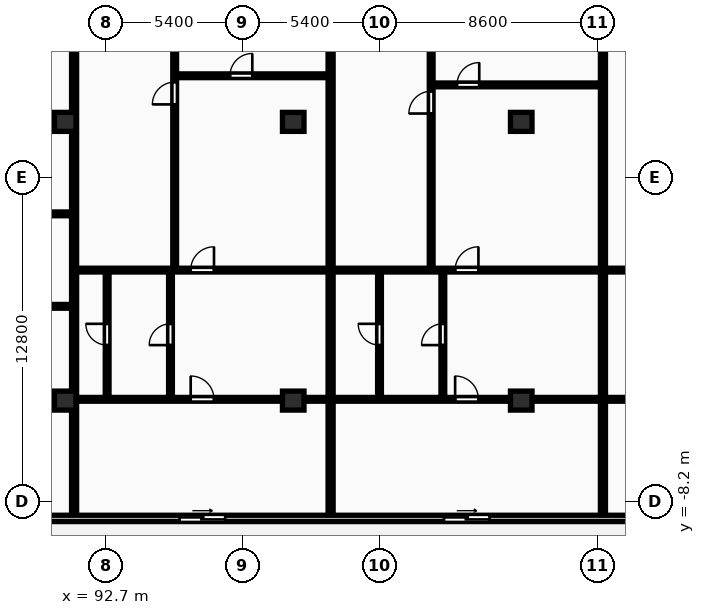
"""IFC4 building model, lengths in metres.
Left out: names, types, materials, properties, quantities, classifications, styles, units other than length and angle.
Written with IfcOpenShell. Run it as: python <this file> out.ifc"""

import sys

from ifc_helpers import new_model, si_unit, direction, frame, frame_2d, origin, origin_2d, place, context, subcontext, project, spatial, rectangle, extrude, element, fill, save


model = new_model("IFC4")
c1 = context("Model", 3, precision=1e-05, world=origin(), true_north=direction((0.0, 1.0)))
c2 = subcontext(c1, "Body", "Model", "MODEL_VIEW")
j1 = project(units=[si_unit("LENGTHUNIT", "METRE"), si_unit("PLANEANGLEUNIT", "RADIAN")], contexts=[c1])
p1 = place(None, origin())
s1 = spatial("IfcSite", under=j1, at=p1, CompositionType="ELEMENT")
p2 = place(p1, origin())
s2 = spatial("IfcBuilding", under=s1, at=p2, CompositionType="ELEMENT")
p3 = place(p2, frame((0.0, 0.0, 100.3)))
s3 = spatial("IfcBuildingStorey", under=s2, at=p3, CompositionType="ELEMENT", Elevation=100.3)
for number, where, z_axis, x_axis in (
    (1, (91.1, -4.2, 0.0), (0.0, 0.0, 1.0), (1.0, 0.0, 0.0)),
    (2, (91.1, 6.8, 0.0), (0.0, 0.0, 1.0), (1.0, 0.0, 0.0)),
    (3, (100.1, -4.2, 0.0), (0.0, 0.0, 1.0), (1.0, 0.0, 0.0)),
    (4, (100.1, 6.8, 0.0), (0.0, 0.0, 1.0), (1.0, 0.0, 0.0)),
    (5, (109.1, -4.2, 0.0), (0.0, 0.0, 1.0), (1.0, 0.0, 0.0)),
    (6, (109.1, 6.8, 0.0), (0.0, 0.0, 1.0), (1.0, 0.0, 0.0)),
):
    element("IfcColumn", number, at=place(p3, frame(where, z_axis=z_axis, x_axis=x_axis)), inside=s3, PredefinedType="COLUMN", context=c2, shape_type="SweptSolid", body=[
        extrude(rectangle(XDim=0.85, YDim=0.75, at=origin_2d()), origin(), (0.0, 0.0, 1.0), 3.25),
    ])
p4 = place(p3, frame((72.7, -8.85, 0.0), z_axis=(0.0, 0.0, 1.0), x_axis=(1.0, 0.0, 0.0)))
e7 = element("IfcWall", 7, at=p4, inside=s3, PredefinedType="STANDARD", context=c2, shape_type="SweptSolid", body=[
    extrude(rectangle(XDim=58.0, YDim=0.25, at=frame_2d((29.0, 0.0))), origin(), (0.0, 0.0, 1.0), 2.97),
])
p5 = place(p4, frame((3.137, 0.0, 0.0)))
e8 = element("IfcOpeningElement", 8, at=p5, cuts=e7, PredefinedType="OPENING", context=c2, shape_type="SweptSolid", body=[
    extrude(rectangle(XDim=1.8, YDim=2.2, at=frame_2d((0.9, 1.1))), frame((0.0, 0.135, 0.0), z_axis=(0.0, -1.0, 0.0), x_axis=(1.0, 0.0, 0.0)), (0.0, 0.0, 1.0), 0.27),
])
p6 = place(p4, frame((12.093, 0.0, 0.85)))
e9 = element("IfcOpeningElement", 9, at=p6, cuts=e7, PredefinedType="OPENING", context=c2, shape_type="SweptSolid", body=[
    extrude(rectangle(XDim=2.4, YDim=1.9, at=frame_2d((1.2, 0.95))), frame((0.0, 0.135, 0.0), z_axis=(0.0, -1.0, 0.0), x_axis=(1.0, 0.0, 0.0)), (0.0, 0.0, 1.0), 0.27),
])
p7 = place(p4, frame((22.913, 0.0, 0.0)))
e10 = element("IfcOpeningElement", 10, at=p7, cuts=e7, PredefinedType="OPENING", context=c2, shape_type="SweptSolid", body=[
    extrude(rectangle(XDim=1.8, YDim=2.2, at=frame_2d((0.9, 1.1))), frame((0.0, 0.135, 0.0), z_axis=(0.0, -1.0, 0.0), x_axis=(1.0, 0.0, 0.0)), (0.0, 0.0, 1.0), 0.27),
])
p8 = place(p4, frame((33.35, 0.0, 0.0)))
e11 = element("IfcOpeningElement", 11, at=p8, cuts=e7, PredefinedType="OPENING", context=c2, shape_type="SweptSolid", body=[
    extrude(rectangle(XDim=1.8, YDim=2.2, at=frame_2d((0.9, 1.1))), frame((0.0, 0.135, 0.0), z_axis=(0.0, -1.0, 0.0), x_axis=(1.0, 0.0, 0.0)), (0.0, 0.0, 1.0), 0.27),
])
p9 = place(p4, frame((49.275, 0.0, 0.85)))
e12 = element("IfcOpeningElement", 12, at=p9, cuts=e7, PredefinedType="OPENING", context=c2, shape_type="SweptSolid", body=[
    extrude(rectangle(XDim=2.4, YDim=1.9, at=frame_2d((1.2, 0.95))), frame((0.0, 0.135, 0.0), z_axis=(0.0, -1.0, 0.0), x_axis=(1.0, 0.0, 0.0)), (0.0, 0.0, 1.0), 0.27),
])
p10 = place(p4, frame((42.613, 0.0, 0.0)))
e13 = element("IfcOpeningElement", 13, at=p10, cuts=e7, PredefinedType="OPENING", context=c2, shape_type="SweptSolid", body=[
    extrude(rectangle(XDim=1.8, YDim=2.2, at=frame_2d((0.9, 1.1))), frame((0.0, 0.135, 0.0), z_axis=(0.0, -1.0, 0.0), x_axis=(1.0, 0.0, 0.0)), (0.0, 0.0, 1.0), 0.27),
])
p11 = place(p4, frame((54.575, 0.0, 0.85)))
e14 = element("IfcOpeningElement", 14, at=p11, cuts=e7, PredefinedType="OPENING", context=c2, shape_type="SweptSolid", body=[
    extrude(rectangle(XDim=2.4, YDim=1.9, at=frame_2d((1.2, 0.95))), frame((0.0, 0.135, 0.0), z_axis=(0.0, -1.0, 0.0), x_axis=(1.0, 0.0, 0.0)), (0.0, 0.0, 1.0), 0.27),
])
p12 = place(p3, frame((91.45, -8.7, 0.0), z_axis=(0.0, 0.0, 1.0), x_axis=(0.0, 1.0, 0.0)))
e15 = element("IfcWall", 15, at=p12, inside=s3, PredefinedType="PARTITIONING", context=c2, shape_type="SweptSolid", body=[
    extrude(rectangle(XDim=24.57, YDim=0.2, at=frame_2d((12.285, 0.0))), origin(), (0.0, 0.0, 1.0), 2.97),
])
for number, where, z_axis, x_axis in (
    (16, (88.01, -0.48, 0.0), (0.0, 0.0, 1.0), (1.0, 0.0, 0.0)),
    (17, (88.01, 3.17, 0.0), (0.0, 0.0, 1.0), (1.0, 0.0, 0.0)),
):
    element("IfcWall", number, at=place(p3, frame(where, z_axis=z_axis, x_axis=x_axis)), inside=s3, PredefinedType="PARTITIONING", context=c2, shape_type="SweptSolid", body=[
        extrude(rectangle(XDim=3.36, YDim=0.15, at=frame_2d((1.68, 0.0))), origin(), (0.0, 0.0, 1.0), 2.97),
    ])
p13 = place(p3, frame((72.78, -4.15, 0.0), z_axis=(0.0, 0.0, 1.0), x_axis=(1.0, 0.0, 0.0)))
e18 = element("IfcWall", 18, at=p13, inside=s3, PredefinedType="PARTITIONING", context=c2, shape_type="SweptSolid", body=[
    extrude(rectangle(XDim=18.59, YDim=0.15, at=frame_2d((9.295, 0.0))), origin(), (0.0, 0.0, 1.0), 2.663),
])
p14 = place(p13, frame((6.685, 0.0, 0.0)))
e19 = element("IfcOpeningElement", 19, at=p14, cuts=e18, PredefinedType="OPENING", context=c2, shape_type="SweptSolid", body=[
    extrude(rectangle(XDim=0.94, YDim=2.1, at=frame_2d((0.47, 1.05))), frame((0.0, 0.085, 0.0), z_axis=(0.0, -1.0, 0.0), x_axis=(1.0, 0.0, 0.0)), (0.0, 0.0, 1.0), 0.17),
])
p15 = place(p13, frame((10.935, 0.0, 0.0)))
e20 = element("IfcOpeningElement", 20, at=p15, cuts=e18, PredefinedType="OPENING", context=c2, shape_type="SweptSolid", body=[
    extrude(rectangle(XDim=0.94, YDim=2.1, at=frame_2d((0.47, 1.05))), frame((0.0, 0.085, 0.0), z_axis=(0.0, -1.0, 0.0), x_axis=(1.0, 0.0, 0.0)), (0.0, 0.0, 1.0), 0.17),
])
p16 = place(p3, frame((101.575, -8.7, 0.0), z_axis=(0.0, 0.0, 1.0), x_axis=(0.0, 1.0, 0.0)))
e21 = element("IfcWall", 21, at=p16, inside=s3, PredefinedType="PARTITIONING", context=c2, shape_type="SweptSolid", body=[
    extrude(rectangle(XDim=24.57, YDim=0.2, at=frame_2d((12.285, 0.0))), origin(), (0.0, 0.0, 1.0), 2.97),
])
p17 = place(p3, frame((95.48, 8.62, 0.0), z_axis=(0.0, 0.0, 1.0), x_axis=(1.0, 0.0, 0.0)))
e22 = element("IfcWall", 22, at=p17, inside=s3, PredefinedType="PARTITIONING", context=c2, shape_type="SweptSolid", body=[
    extrude(rectangle(XDim=6.015, YDim=0.15, at=frame_2d((3.008, 0.0))), origin(), (0.0, 0.0, 1.0), 2.97),
])
p18 = place(p17, frame((2.124, 0.0, 0.0)))
e23 = element("IfcOpeningElement", 23, at=p18, cuts=e22, PredefinedType="OPENING", context=c2, shape_type="SweptSolid", body=[
    extrude(rectangle(XDim=0.88, YDim=2.06, at=frame_2d((0.44, 1.03))), frame((0.0, 0.085, 0.0), z_axis=(0.0, -1.0, 0.0), x_axis=(1.0, 0.0, 0.0)), (0.0, 0.0, 1.0), 0.17),
])
p19 = place(p3, frame((95.42, 0.99, 0.0), z_axis=(0.0, 0.0, 1.0), x_axis=(0.0, 1.0, 0.0)))
e24 = element("IfcWall", 24, at=p19, inside=s3, PredefinedType="PARTITIONING", context=c2, shape_type="SweptSolid", body=[
    extrude(rectangle(XDim=14.9, YDim=0.15, at=frame_2d((7.45, 0.0))), origin(), (0.0, 0.0, 1.0), 2.97),
])
p20 = place(p19, frame((6.5, 0.0, 0.0)))
e25 = element("IfcOpeningElement", 25, at=p20, cuts=e24, PredefinedType="OPENING", context=c2, shape_type="SweptSolid", body=[
    extrude(rectangle(XDim=0.88, YDim=2.06, at=frame_2d((0.44, 1.03))), frame((0.0, 0.085, 0.0), z_axis=(0.0, -1.0, 0.0), x_axis=(1.0, 0.0, 0.0)), (0.0, 0.0, 1.0), 0.17),
])
p21 = place(p3, frame((92.755, -4.09, 0.0), z_axis=(0.0, 0.0, 1.0), x_axis=(0.0, 1.0, 0.0)))
e26 = element("IfcWall", 26, at=p21, inside=s3, PredefinedType="PARTITIONING", context=c2, shape_type="SweptSolid", body=[
    extrude(rectangle(XDim=5.0, YDim=0.15, at=frame_2d((2.5, 0.0))), origin(), (0.0, 0.0, 1.0), 2.97),
])
p22 = place(p21, frame((2.08, 0.0, 0.0)))
e27 = element("IfcOpeningElement", 27, at=p22, cuts=e26, PredefinedType="OPENING", context=c2, shape_type="SweptSolid", body=[
    extrude(rectangle(XDim=0.84, YDim=2.04, at=frame_2d((0.42, 1.02))), frame((0.0, 0.085, 0.0), z_axis=(0.0, -1.0, 0.0), x_axis=(1.0, 0.0, 0.0)), (0.0, 0.0, 1.0), 0.17),
])
p23 = place(p3, frame((95.255, -4.09, 0.0), z_axis=(0.0, 0.0, 1.0), x_axis=(0.0, 1.0, 0.0)))
e28 = element("IfcWall", 28, at=p23, inside=s3, PredefinedType="PARTITIONING", context=c2, shape_type="SweptSolid", body=[
    extrude(rectangle(XDim=5.0, YDim=0.15, at=frame_2d((2.5, 0.0))), origin(), (0.0, 0.0, 1.0), 2.97),
])
p24 = place(p23, frame((2.08, 0.0, 0.0)))
e29 = element("IfcOpeningElement", 29, at=p24, cuts=e28, PredefinedType="OPENING", context=c2, shape_type="SweptSolid", body=[
    extrude(rectangle(XDim=0.84, YDim=2.04, at=frame_2d((0.42, 1.02))), frame((0.0, 0.085, 0.0), z_axis=(0.0, -1.0, 0.0), x_axis=(1.0, 0.0, 0.0)), (0.0, 0.0, 1.0), 0.17),
])
p25 = place(p3, frame((91.53, 0.95, 0.0), z_axis=(0.0, 0.0, 1.0), x_axis=(1.0, 0.0, 0.0)))
e30 = element("IfcWall", 30, at=p25, inside=s3, PredefinedType="PARTITIONING", context=c2, shape_type="SweptSolid", body=[
    extrude(rectangle(XDim=9.965, YDim=0.15, at=frame_2d((4.982, 0.0))), origin(), (0.0, 0.0, 1.0), 2.97),
])
p26 = place(p25, frame((4.522, 0.0, 0.0)))
e31 = element("IfcOpeningElement", 31, at=p26, cuts=e30, PredefinedType="OPENING", context=c2, shape_type="SweptSolid", body=[
    extrude(rectangle(XDim=0.92, YDim=2.08, at=frame_2d((0.46, 1.04))), frame((0.0, 0.085, 0.0), z_axis=(0.0, -1.0, 0.0), x_axis=(1.0, 0.0, 0.0)), (0.0, 0.0, 1.0), 0.17),
])
p27 = place(p3, frame((91.53, -4.15, 0.0), z_axis=(0.0, 0.0, 1.0), x_axis=(1.0, 0.0, 0.0)))
e32 = element("IfcWall", 32, at=p27, inside=s3, PredefinedType="PARTITIONING", context=c2, shape_type="SweptSolid", body=[
    extrude(rectangle(XDim=9.965, YDim=0.15, at=frame_2d((4.982, 0.0))), origin(), (0.0, 0.0, 1.0), 2.663),
])
p28 = place(p27, frame((4.522, 0.0, 0.0)))
e33 = element("IfcOpeningElement", 33, at=p28, cuts=e32, PredefinedType="OPENING", context=c2, shape_type="SweptSolid", body=[
    extrude(rectangle(XDim=0.92, YDim=2.08, at=frame_2d((0.46, 1.04))), frame((0.0, 0.085, 0.0), z_axis=(0.0, -1.0, 0.0), x_axis=(1.0, 0.0, 0.0)), (0.0, 0.0, 1.0), 0.17),
])
p29 = place(p3, frame((112.325, -8.7, 0.0), z_axis=(0.0, 0.0, 1.0), x_axis=(0.0, 1.0, 0.0)))
e34 = element("IfcWall", 34, at=p29, inside=s3, PredefinedType="PARTITIONING", context=c2, shape_type="SweptSolid", body=[
    extrude(rectangle(XDim=24.57, YDim=0.2, at=frame_2d((12.285, 0.0))), origin(), (0.0, 0.0, 1.0), 2.97),
])
p30 = place(p3, frame((105.605, 8.26, 0.0), z_axis=(0.0, 0.0, 1.0), x_axis=(1.0, 0.0, 0.0)))
e35 = element("IfcWall", 35, at=p30, inside=s3, PredefinedType="PARTITIONING", context=c2, shape_type="SweptSolid", body=[
    extrude(rectangle(XDim=6.64, YDim=0.15, at=frame_2d((3.32, 0.0))), origin(), (0.0, 0.0, 1.0), 2.97),
])
p31 = place(p30, frame((0.957, 0.0, 0.0)))
e36 = element("IfcOpeningElement", 36, at=p31, cuts=e35, PredefinedType="OPENING", context=c2, shape_type="SweptSolid", body=[
    extrude(rectangle(XDim=0.88, YDim=2.06, at=frame_2d((0.44, 1.03))), frame((0.0, 0.085, 0.0), z_axis=(0.0, -1.0, 0.0), x_axis=(1.0, 0.0, 0.0)), (0.0, 0.0, 1.0), 0.17),
])
p32 = place(p3, frame((105.545, 0.99, 0.0), z_axis=(0.0, 0.0, 1.0), x_axis=(0.0, 1.0, 0.0)))
e37 = element("IfcWall", 37, at=p32, inside=s3, PredefinedType="PARTITIONING", context=c2, shape_type="SweptSolid", body=[
    extrude(rectangle(XDim=14.9, YDim=0.15, at=frame_2d((7.45, 0.0))), origin(), (0.0, 0.0, 1.0), 2.97),
])
p33 = place(p32, frame((6.14, 0.0, 0.0)))
e38 = element("IfcOpeningElement", 38, at=p33, cuts=e37, PredefinedType="OPENING", context=c2, shape_type="SweptSolid", body=[
    extrude(rectangle(XDim=0.88, YDim=2.06, at=frame_2d((0.44, 1.03))), frame((0.0, 0.085, 0.0), z_axis=(0.0, -1.0, 0.0), x_axis=(1.0, 0.0, 0.0)), (0.0, 0.0, 1.0), 0.17),
])
p34 = place(p3, frame((103.505, -4.09, 0.0), z_axis=(0.0, 0.0, 1.0), x_axis=(0.0, 1.0, 0.0)))
e39 = element("IfcWall", 39, at=p34, inside=s3, PredefinedType="PARTITIONING", context=c2, shape_type="SweptSolid", body=[
    extrude(rectangle(XDim=5.0, YDim=0.15, at=frame_2d((2.5, 0.0))), origin(), (0.0, 0.0, 1.0), 2.97),
])
p35 = place(p34, frame((2.08, 0.0, 0.0)))
e40 = element("IfcOpeningElement", 40, at=p35, cuts=e39, PredefinedType="OPENING", context=c2, shape_type="SweptSolid", body=[
    extrude(rectangle(XDim=0.84, YDim=2.04, at=frame_2d((0.42, 1.02))), frame((0.0, 0.085, 0.0), z_axis=(0.0, -1.0, 0.0), x_axis=(1.0, 0.0, 0.0)), (0.0, 0.0, 1.0), 0.17),
])
p36 = place(p3, frame((106.005, -4.09, 0.0), z_axis=(0.0, 0.0, 1.0), x_axis=(0.0, 1.0, 0.0)))
e41 = element("IfcWall", 41, at=p36, inside=s3, PredefinedType="PARTITIONING", context=c2, shape_type="SweptSolid", body=[
    extrude(rectangle(XDim=5.0, YDim=0.15, at=frame_2d((2.5, 0.0))), origin(), (0.0, 0.0, 1.0), 2.97),
])
p37 = place(p36, frame((2.08, 0.0, 0.0)))
e42 = element("IfcOpeningElement", 42, at=p37, cuts=e41, PredefinedType="OPENING", context=c2, shape_type="SweptSolid", body=[
    extrude(rectangle(XDim=0.84, YDim=2.04, at=frame_2d((0.42, 1.02))), frame((0.0, 0.085, 0.0), z_axis=(0.0, -1.0, 0.0), x_axis=(1.0, 0.0, 0.0)), (0.0, 0.0, 1.0), 0.17),
])
p38 = place(p3, frame((101.655, 0.95, 0.0), z_axis=(0.0, 0.0, 1.0), x_axis=(1.0, 0.0, 0.0)))
e43 = element("IfcWall", 43, at=p38, inside=s3, PredefinedType="PARTITIONING", context=c2, shape_type="SweptSolid", body=[
    extrude(rectangle(XDim=10.59, YDim=0.15, at=frame_2d((5.295, 0.0))), origin(), (0.0, 0.0, 1.0), 2.97),
])
p39 = place(p38, frame((4.835, 0.0, 0.0)))
e44 = element("IfcOpeningElement", 44, at=p39, cuts=e43, PredefinedType="OPENING", context=c2, shape_type="SweptSolid", body=[
    extrude(rectangle(XDim=0.92, YDim=2.08, at=frame_2d((0.46, 1.04))), frame((0.0, 0.085, 0.0), z_axis=(0.0, -1.0, 0.0), x_axis=(1.0, 0.0, 0.0)), (0.0, 0.0, 1.0), 0.17),
])
p40 = place(p3, frame((101.655, -4.15, 0.0), z_axis=(0.0, 0.0, 1.0), x_axis=(1.0, 0.0, 0.0)))
e45 = element("IfcWall", 45, at=p40, inside=s3, PredefinedType="PARTITIONING", context=c2, shape_type="SweptSolid", body=[
    extrude(rectangle(XDim=10.59, YDim=0.15, at=frame_2d((5.295, 0.0))), origin(), (0.0, 0.0, 1.0), 2.663),
])
p41 = place(p40, frame((4.835, 0.0, 0.0)))
e46 = element("IfcOpeningElement", 46, at=p41, cuts=e45, PredefinedType="OPENING", context=c2, shape_type="SweptSolid", body=[
    extrude(rectangle(XDim=0.92, YDim=2.08, at=frame_2d((0.46, 1.04))), frame((0.0, 0.085, 0.0), z_axis=(0.0, -1.0, 0.0), x_axis=(1.0, 0.0, 0.0)), (0.0, 0.0, 1.0), 0.17),
])
p42 = place(p3, frame((112.405, 0.95, 0.0), z_axis=(0.0, 0.0, 1.0), x_axis=(1.0, 0.0, 0.0)))
e47 = element("IfcWall", 47, at=p42, inside=s3, PredefinedType="PARTITIONING", context=c2, shape_type="SweptSolid", body=[
    extrude(rectangle(XDim=18.215, YDim=0.15, at=frame_2d((9.107, 0.0))), origin(), (0.0, 0.0, 1.0), 2.97),
])
p43 = place(p42, frame((2.72, 0.0, 0.0)))
e48 = element("IfcOpeningElement", 48, at=p43, cuts=e47, PredefinedType="OPENING", context=c2, shape_type="SweptSolid", body=[
    extrude(rectangle(XDim=0.92, YDim=2.08, at=frame_2d((0.46, 1.04))), frame((0.0, 0.085, 0.0), z_axis=(0.0, -1.0, 0.0), x_axis=(1.0, 0.0, 0.0)), (0.0, 0.0, 1.0), 0.17),
])
p44 = place(p3, frame((112.405, -4.15, 0.0), z_axis=(0.0, 0.0, 1.0), x_axis=(1.0, 0.0, 0.0)))
e49 = element("IfcWall", 49, at=p44, inside=s3, PredefinedType="PARTITIONING", context=c2, shape_type="SweptSolid", body=[
    extrude(rectangle(XDim=13.965, YDim=0.15, at=frame_2d((6.982, 0.0))), origin(), (0.0, 0.0, 1.0), 2.663),
])
p45 = place(p44, frame((3.072, 0.0, 0.0)))
e50 = element("IfcOpeningElement", 50, at=p45, cuts=e49, PredefinedType="OPENING", context=c2, shape_type="SweptSolid", body=[
    extrude(rectangle(XDim=0.94, YDim=2.1, at=frame_2d((0.47, 1.05))), frame((0.0, 0.085, 0.0), z_axis=(0.0, -1.0, 0.0), x_axis=(1.0, 0.0, 0.0)), (0.0, 0.0, 1.0), 0.17),
])
p46 = place(p44, frame((7.825, 0.0, 0.0)))
e51 = element("IfcOpeningElement", 51, at=p46, cuts=e49, PredefinedType="OPENING", context=c2, shape_type="SweptSolid", body=[
    extrude(rectangle(XDim=0.88, YDim=2.06, at=frame_2d((0.44, 1.03))), frame((0.0, 0.085, 0.0), z_axis=(0.0, -1.0, 0.0), x_axis=(1.0, 0.0, 0.0)), (0.0, 0.0, 1.0), 0.17),
])
p47 = place(p7, origin())
e52 = element("IfcDoor", 52, at=p47, inside=s3, OperationType="SLIDING_TO_RIGHT", PredefinedType="DOOR", context=c2, shape_type="SweptSolid", body=[
    extrude(rectangle(XDim=1.8, YDim=2.2, at=frame_2d((0.9, 1.1))), frame((0.0, 0.025, 0.0), z_axis=(0.0, -1.0, 0.0), x_axis=(1.0, 0.0, 0.0)), (0.0, 0.0, 1.0), 0.05),
])
fill(e10, e52)
p48 = place(p8, origin())
e53 = element("IfcDoor", 53, at=p48, inside=s3, OperationType="SLIDING_TO_RIGHT", PredefinedType="DOOR", context=c2, shape_type="SweptSolid", body=[
    extrude(rectangle(XDim=1.8, YDim=2.2, at=frame_2d((0.9, 1.1))), frame((0.0, 0.025, 0.0), z_axis=(0.0, -1.0, 0.0), x_axis=(1.0, 0.0, 0.0)), (0.0, 0.0, 1.0), 0.05),
])
fill(e11, e53)
p49 = place(p18, origin())
e54 = element("IfcDoor", 54, at=p49, inside=s3, OperationType="SINGLE_SWING_RIGHT", PredefinedType="DOOR", context=c2, shape_type="SweptSolid", body=[
    extrude(rectangle(XDim=0.88, YDim=2.06, at=frame_2d((0.44, 1.03))), frame((0.0, 0.025, 0.0), z_axis=(0.0, -1.0, 0.0), x_axis=(1.0, 0.0, 0.0)), (0.0, 0.0, 1.0), 0.05),
])
fill(e23, e54)
p50 = place(p20, origin())
e55 = element("IfcDoor", 55, at=p50, inside=s3, OperationType="SINGLE_SWING_LEFT", PredefinedType="DOOR", context=c2, shape_type="SweptSolid", body=[
    extrude(rectangle(XDim=0.88, YDim=2.06, at=frame_2d((0.44, 1.03))), frame((0.0, 0.025, 0.0), z_axis=(0.0, -1.0, 0.0), x_axis=(1.0, 0.0, 0.0)), (0.0, 0.0, 1.0), 0.05),
])
fill(e25, e55)
p51 = place(p22, origin())
e56 = element("IfcDoor", 56, at=p51, inside=s3, OperationType="SINGLE_SWING_RIGHT", PredefinedType="DOOR", context=c2, shape_type="SweptSolid", body=[
    extrude(rectangle(XDim=0.84, YDim=2.04, at=frame_2d((0.42, 1.02))), frame((0.0, 0.025, 0.0), z_axis=(0.0, -1.0, 0.0), x_axis=(1.0, 0.0, 0.0)), (0.0, 0.0, 1.0), 0.05),
])
fill(e27, e56)
p52 = place(p24, origin())
e57 = element("IfcDoor", 57, at=p52, inside=s3, OperationType="SINGLE_SWING_LEFT", PredefinedType="DOOR", context=c2, shape_type="SweptSolid", body=[
    extrude(rectangle(XDim=0.84, YDim=2.04, at=frame_2d((0.42, 1.02))), frame((0.0, 0.025, 0.0), z_axis=(0.0, -1.0, 0.0), x_axis=(1.0, 0.0, 0.0)), (0.0, 0.0, 1.0), 0.05),
])
fill(e29, e57)
p53 = place(p26, origin())
e58 = element("IfcDoor", 58, at=p53, inside=s3, OperationType="SINGLE_SWING_RIGHT", PredefinedType="DOOR", context=c2, shape_type="SweptSolid", body=[
    extrude(rectangle(XDim=0.92, YDim=2.08, at=frame_2d((0.46, 1.04))), frame((0.0, 0.025, 0.0), z_axis=(0.0, -1.0, 0.0), x_axis=(1.0, 0.0, 0.0)), (0.0, 0.0, 1.0), 0.05),
])
fill(e31, e58)
p54 = place(p28, origin())
e59 = element("IfcDoor", 59, at=p54, inside=s3, OperationType="SINGLE_SWING_LEFT", PredefinedType="DOOR", context=c2, shape_type="SweptSolid", body=[
    extrude(rectangle(XDim=0.92, YDim=2.08, at=frame_2d((0.46, 1.04))), frame((0.0, 0.025, 0.0), z_axis=(0.0, -1.0, 0.0), x_axis=(1.0, 0.0, 0.0)), (0.0, 0.0, 1.0), 0.05),
])
fill(e33, e59)
p55 = place(p31, origin())
e60 = element("IfcDoor", 60, at=p55, inside=s3, OperationType="SINGLE_SWING_RIGHT", PredefinedType="DOOR", context=c2, shape_type="SweptSolid", body=[
    extrude(rectangle(XDim=0.88, YDim=2.06, at=frame_2d((0.44, 1.03))), frame((0.0, 0.025, 0.0), z_axis=(0.0, -1.0, 0.0), x_axis=(1.0, 0.0, 0.0)), (0.0, 0.0, 1.0), 0.05),
])
fill(e36, e60)
p56 = place(p33, origin())
e61 = element("IfcDoor", 61, at=p56, inside=s3, OperationType="SINGLE_SWING_LEFT", PredefinedType="DOOR", context=c2, shape_type="SweptSolid", body=[
    extrude(rectangle(XDim=0.88, YDim=2.06, at=frame_2d((0.44, 1.03))), frame((0.0, 0.025, 0.0), z_axis=(0.0, -1.0, 0.0), x_axis=(1.0, 0.0, 0.0)), (0.0, 0.0, 1.0), 0.05),
])
fill(e38, e61)
p57 = place(p35, origin())
e62 = element("IfcDoor", 62, at=p57, inside=s3, OperationType="SINGLE_SWING_RIGHT", PredefinedType="DOOR", context=c2, shape_type="SweptSolid", body=[
    extrude(rectangle(XDim=0.84, YDim=2.04, at=frame_2d((0.42, 1.02))), frame((0.0, 0.025, 0.0), z_axis=(0.0, -1.0, 0.0), x_axis=(1.0, 0.0, 0.0)), (0.0, 0.0, 1.0), 0.05),
])
fill(e40, e62)
p58 = place(p37, origin())
e63 = element("IfcDoor", 63, at=p58, inside=s3, OperationType="SINGLE_SWING_LEFT", PredefinedType="DOOR", context=c2, shape_type="SweptSolid", body=[
    extrude(rectangle(XDim=0.84, YDim=2.04, at=frame_2d((0.42, 1.02))), frame((0.0, 0.025, 0.0), z_axis=(0.0, -1.0, 0.0), x_axis=(1.0, 0.0, 0.0)), (0.0, 0.0, 1.0), 0.05),
])
fill(e42, e63)
p59 = place(p39, origin())
e64 = element("IfcDoor", 64, at=p59, inside=s3, OperationType="SINGLE_SWING_RIGHT", PredefinedType="DOOR", context=c2, shape_type="SweptSolid", body=[
    extrude(rectangle(XDim=0.92, YDim=2.08, at=frame_2d((0.46, 1.04))), frame((0.0, 0.025, 0.0), z_axis=(0.0, -1.0, 0.0), x_axis=(1.0, 0.0, 0.0)), (0.0, 0.0, 1.0), 0.05),
])
fill(e44, e64)
p60 = place(p41, origin())
e65 = element("IfcDoor", 65, at=p60, inside=s3, OperationType="SINGLE_SWING_LEFT", PredefinedType="DOOR", context=c2, shape_type="SweptSolid", body=[
    extrude(rectangle(XDim=0.92, YDim=2.08, at=frame_2d((0.46, 1.04))), frame((0.0, 0.025, 0.0), z_axis=(0.0, -1.0, 0.0), x_axis=(1.0, 0.0, 0.0)), (0.0, 0.0, 1.0), 0.05),
])
fill(e46, e65)
save(model, sys.argv[1])
